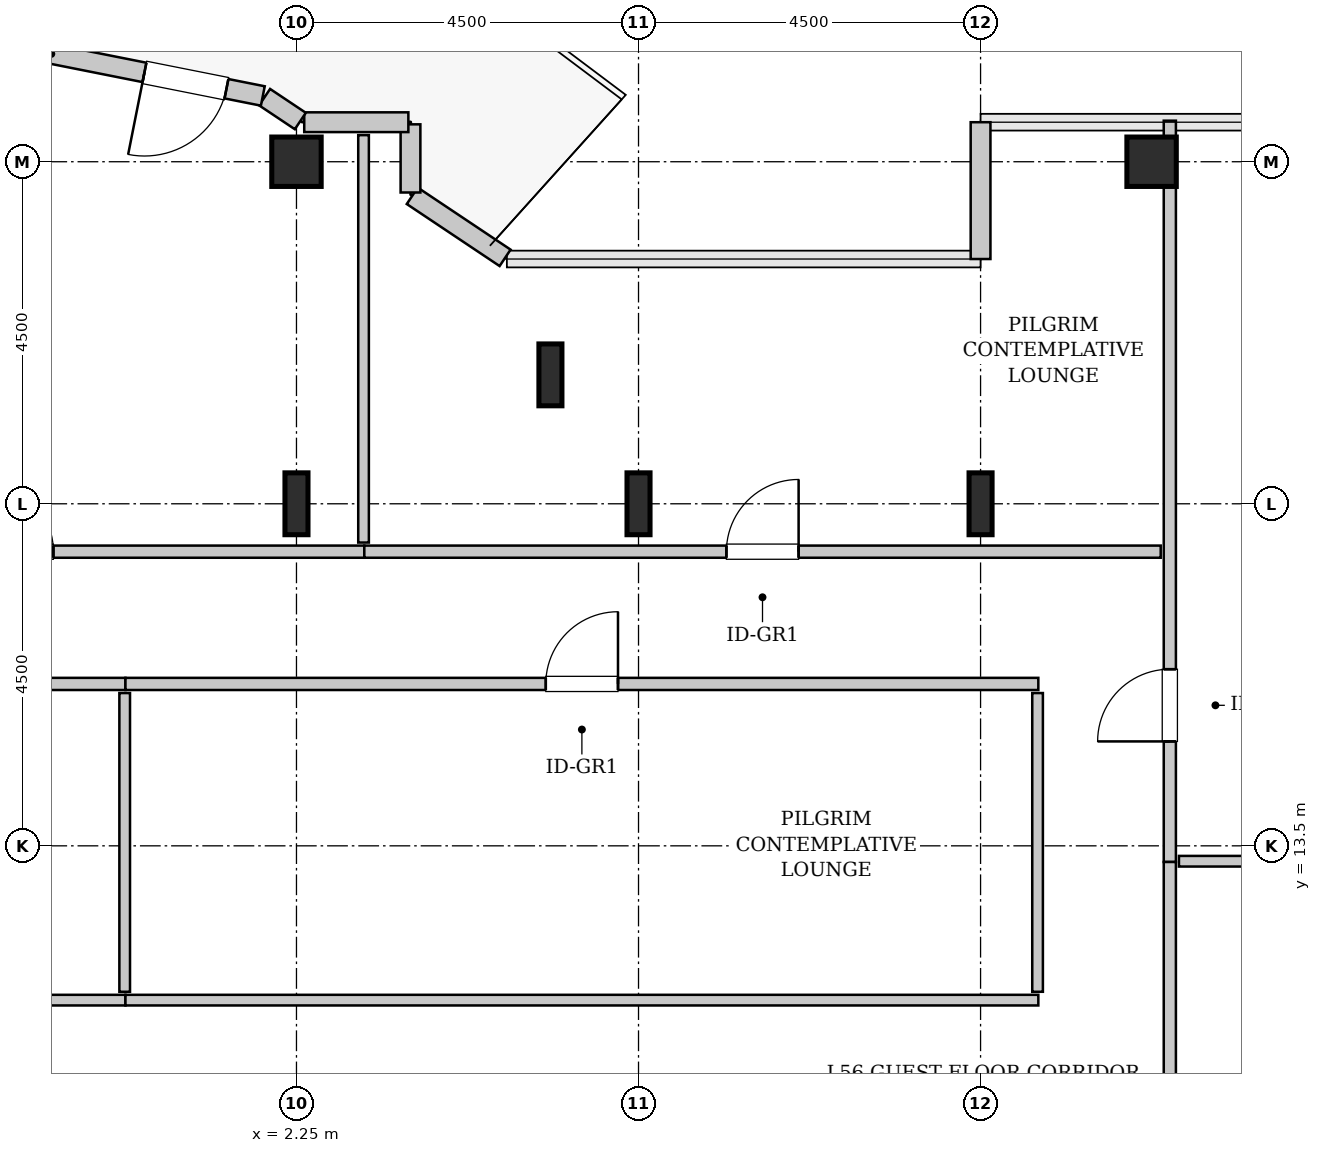
"""IFC4 building model, lengths in metres.
Left out: names, types, materials, properties, quantities, classifications, styles, units other than length and angle.
Written with IfcOpenShell. Run it as: python <this file> out.ifc"""

import sys

from ifc_helpers import new_model, si_unit, direction, frame, frame_2d, origin, origin_2d, place, context, subcontext, project, spatial, rectangle, hollow_rectangle, i_section, extrude, source, transform, mapped, element, fill, save


model = new_model("IFC4")
c1 = context("Model", 3, precision=1e-05, world=origin(), true_north=direction((0.0, 1.0)))
c2 = subcontext(c1, "Body", "Model", "MODEL_VIEW")
j1 = project(units=[si_unit("LENGTHUNIT", "METRE"), si_unit("PLANEANGLEUNIT", "RADIAN")], contexts=[c1])
p1 = place(None, origin())
s1 = spatial("IfcSite", under=j1, at=p1, CompositionType="ELEMENT")
p2 = place(p1, origin())
s2 = spatial("IfcBuilding", under=s1, at=p2, CompositionType="ELEMENT")
p3 = place(p2, frame((0.0, 0.0, 225.6)))
s3 = spatial("IfcBuildingStorey", under=s2, at=p3, CompositionType="ELEMENT", Elevation=225.6)
m1 = source(origin(), c2, "Body", "SweptSolid", [
    extrude(i_section(OverallWidth=0.303, OverallDepth=0.814, WebThickness=0.021, FlangeThickness=0.04, FilletRadius=0.03, at=origin_2d()), origin(), (0.0, 0.0, 1.0), 3.8),
])
p4 = place(p3, frame((2.25, 18.0, 0.0), z_axis=(0.0, 0.0, 1.0), x_axis=(1.0, 0.0, 0.0)))
e1 = element("IfcColumn", 1, at=p4, inside=s3, PredefinedType="COLUMN", context=c2, shape_type="MappedRepresentation", body=[
    mapped(m1, transform((0.0, 0.0, 0.0), x_axis=(1.0, 0.0, 0.0), y_axis=(0.0, 1.0, 0.0), z_axis=(0.0, 0.0, 1.0), scale=1.0)),
])
m2 = source(origin(), c2, "Body", "SweptSolid", [
    extrude(hollow_rectangle(XDim=0.65, YDim=0.65, WallThickness=0.032, InnerFilletRadius=0.032, OuterFilletRadius=0.064, at=origin_2d()), origin(), (0.0, 0.0, 1.0), 3.8),
])
p5 = place(p3, frame((2.25, 22.5, 0.0), z_axis=(0.0, 0.0, 1.0), x_axis=(1.0, 0.0, 0.0)))
e2 = element("IfcColumn", 2, at=p5, inside=s3, PredefinedType="COLUMN", context=c2, shape_type="MappedRepresentation", body=[
    mapped(m2, transform((0.0, 0.0, 0.0), x_axis=(1.0, 0.0, 0.0), y_axis=(0.0, 1.0, 0.0), z_axis=(0.0, 0.0, 1.0), scale=1.0)),
])
for number, where, z_axis, x_axis in (
    (3, (5.591, 19.696, 0.0), (0.0, 0.0, 1.0), (1.0, 0.0, 0.0)),
    (4, (6.75, 18.0, 0.0), (0.0, 0.0, 1.0), (1.0, 0.0, 0.0)),
    (5, (11.25, 18.0, 0.0), (0.0, 0.0, 1.0), (1.0, 0.0, 0.0)),
):
    element("IfcColumn", number, at=place(p3, frame(where, z_axis=z_axis, x_axis=x_axis)), inside=s3, PredefinedType="COLUMN", context=c2, shape_type="MappedRepresentation", body=[
        mapped(m1, transform((0.0, 0.0, 0.0), x_axis=(1.0, 0.0, 0.0), y_axis=(0.0, 1.0, 0.0), z_axis=(0.0, 0.0, 1.0), scale=1.0)),
    ])
p6 = place(p3, frame((13.5, 22.5, 0.0), z_axis=(0.0, 0.0, 1.0), x_axis=(1.0, 0.0, 0.0)))
e6 = element("IfcColumn", 6, at=p6, inside=s3, PredefinedType="COLUMN", context=c2, shape_type="MappedRepresentation", body=[
    mapped(m2, transform((0.0, 0.0, 0.0), x_axis=(1.0, 0.0, 0.0), y_axis=(0.0, 1.0, 0.0), z_axis=(0.0, 0.0, 1.0), scale=1.0)),
])
m3 = source(origin(), c2, "Body", "SweptSolid", [
    extrude(rectangle(XDim=1.8, YDim=0.26, at=frame_2d((0.9, 0.0))), origin(), (0.0, 0.0, 1.0), 3.55),
])
p7 = place(p3, frame((11.25, 23.02, 0.0), z_axis=(0.0, 0.0, 1.0), x_axis=(0.0, -1.0, 0.0)))
e7 = element("IfcWall", 7, at=p7, inside=s3, PredefinedType="SOLIDWALL", context=c2, shape_type="MappedRepresentation", body=[
    mapped(m3, transform((0.0, 0.0, 0.0), x_axis=(1.0, 0.0, 0.0), y_axis=(0.0, 1.0, 0.0), z_axis=(0.0, 0.0, 1.0), scale=1.0)),
])
m4 = source(origin(), c2, "Body", "SweptSolid", [
    extrude(rectangle(XDim=1.469, YDim=0.26, at=frame_2d((0.734, 0.0))), origin(), (0.0, 0.0, 1.0), 3.55),
])
p8 = place(p3, frame((4.995, 21.236, 0.0), z_axis=(0.0, 0.0, 1.0), x_axis=(-0.831461760506, 0.555581983884, 0.0)))
e8 = element("IfcWall", 8, at=p8, inside=s3, PredefinedType="SOLIDWALL", context=c2, shape_type="MappedRepresentation", body=[
    mapped(m4, transform((0.0, 0.0, 0.0), x_axis=(1.0, 0.0, 0.0), y_axis=(0.0, 1.0, 0.0), z_axis=(0.0, 0.0, 1.0), scale=1.0)),
])
m5 = source(origin(), c2, "Body", "SweptSolid", [
    extrude(rectangle(XDim=0.897, YDim=0.26, at=frame_2d((0.448, 0.0))), origin(), (0.0, 0.0, 1.0), 3.55),
])
p9 = place(p3, frame((3.75, 22.095, 0.0), z_axis=(0.0, 0.0, 1.0), x_axis=(0.0, 1.0, 0.0)))
e9 = element("IfcWall", 9, at=p9, inside=s3, PredefinedType="SOLIDWALL", context=c2, shape_type="MappedRepresentation", body=[
    mapped(m5, transform((0.0, 0.0, 0.0), x_axis=(1.0, 0.0, 0.0), y_axis=(0.0, 1.0, 0.0), z_axis=(0.0, 0.0, 1.0), scale=1.0)),
])
m6 = source(origin(), c2, "Body", "SweptSolid", [
    extrude(rectangle(XDim=1.37, YDim=0.26, at=frame_2d((0.685, 0.0))), origin(), (0.0, 0.0, 1.0), 3.55),
])
p10 = place(p3, frame((3.722, 23.02, 0.0), z_axis=(0.0, 0.0, 1.0), x_axis=(-1.0, 0.0, 0.0)))
e10 = element("IfcWall", 10, at=p10, inside=s3, PredefinedType="SOLIDWALL", context=c2, shape_type="MappedRepresentation", body=[
    mapped(m6, transform((0.0, 0.0, 0.0), x_axis=(1.0, 0.0, 0.0), y_axis=(0.0, 1.0, 0.0), z_axis=(0.0, 0.0, 1.0), scale=1.0)),
])
m7 = source(origin(), c2, "Body", "SweptSolid", [
    extrude(rectangle(XDim=0.565, YDim=0.26, at=frame_2d((0.283, 0.0))), origin(), (0.0, 0.0, 1.0), 3.55),
])
p11 = place(p3, frame((2.301, 23.036, 0.0), z_axis=(0.0, 0.0, 1.0), x_axis=(-0.831651492666, 0.555297933317, 0.0)))
e11 = element("IfcWall", 11, at=p11, inside=s3, PredefinedType="SOLIDWALL", context=c2, shape_type="MappedRepresentation", body=[
    mapped(m7, transform((0.0, 0.0, 0.0), x_axis=(1.0, 0.0, 0.0), y_axis=(0.0, 1.0, 0.0), z_axis=(0.0, 0.0, 1.0), scale=1.0)),
])
m8 = source(origin(), c2, "Body", "SweptSolid", [
    extrude(rectangle(XDim=4.137, YDim=0.26, at=frame_2d((2.068, 0.0))), origin(), (0.0, 0.0, 1.0), 3.55),
])
p12 = place(p3, frame((1.807, 23.365, 0.0), z_axis=(0.0, 0.0, 1.0), x_axis=(-0.980782170794, 0.195105954428, 0.0)))
e12 = element("IfcWall", 12, at=p12, inside=s3, PredefinedType="SOLIDWALL", context=c2, shape_type="MappedRepresentation", body=[
    mapped(m8, transform((0.0, 0.0, 0.0), x_axis=(1.0, 0.0, 0.0), y_axis=(0.0, 1.0, 0.0), z_axis=(0.0, 0.0, 1.0), scale=1.0)),
])
p13 = place(p12, frame((0.488, 0.0, 0.0)))
e13 = element("IfcOpeningElement", 13, at=p13, cuts=e12, PredefinedType="OPENING", context=c2, shape_type="SweptSolid", body=[
    extrude(rectangle(XDim=1.1, YDim=2.2, at=frame_2d((0.55, 1.1))), frame((0.0, 0.14, 0.0), z_axis=(0.0, -1.0, 0.0), x_axis=(1.0, 0.0, 0.0)), (0.0, 0.0, 1.0), 0.28),
])
m9 = source(origin(), c2, "Body", "SweptSolid", [
    extrude(rectangle(XDim=9.752, YDim=0.16, at=frame_2d((4.876, 0.0))), origin(), (0.0, 0.0, 1.0), 3.535),
])
p14 = place(p3, frame((13.74, 13.288, 0.0), z_axis=(0.0, 0.0, 1.0), x_axis=(0.0, 1.0, 0.0)))
e14 = element("IfcWall", 14, at=p14, inside=s3, PredefinedType="PARTITIONING", context=c2, shape_type="MappedRepresentation", body=[
    mapped(m9, transform((0.0, 0.0, 0.0), x_axis=(1.0, 0.0, 0.0), y_axis=(0.0, 1.0, 0.0), z_axis=(0.0, 0.0, 1.0), scale=1.0)),
])
p15 = place(p14, frame((1.586, 0.0, 0.0)))
e15 = element("IfcOpeningElement", 15, at=p15, cuts=e14, PredefinedType="OPENING", context=c2, shape_type="SweptSolid", body=[
    extrude(rectangle(XDim=0.95, YDim=2.1, at=frame_2d((0.475, 1.05))), frame((0.0, 0.09, 0.0), z_axis=(0.0, -1.0, 0.0), x_axis=(1.0, 0.0, 0.0)), (0.0, 0.0, 1.0), 0.18),
])
m10 = source(origin(), c2, "Body", "SweptSolid", [
    extrude(rectangle(XDim=11.43, YDim=0.14, at=frame_2d((5.715, 0.0))), origin(), (0.0, 0.0, 1.0), 2.925),
])
p16 = place(p3, frame((13.86, 13.298, 0.0), z_axis=(0.0, 0.0, 1.0), x_axis=(1.0, 0.0, 0.0)))
e16 = element("IfcWall", 16, at=p16, inside=s3, PredefinedType="PARTITIONING", context=c2, shape_type="MappedRepresentation", body=[
    mapped(m10, transform((0.0, 0.0, 0.0), x_axis=(1.0, 0.0, 0.0), y_axis=(0.0, 1.0, 0.0), z_axis=(0.0, 0.0, 1.0), scale=1.0)),
])
m11 = source(origin(), c2, "Body", "SweptSolid", [
    extrude(rectangle(XDim=9.693, YDim=0.16, at=frame_2d((4.846, 0.0))), origin(), (0.0, 0.0, 1.0), 3.535),
])
p17 = place(p3, frame((13.74, 3.595, 0.0), z_axis=(0.0, 0.0, 1.0), x_axis=(0.0, 1.0, 0.0)))
e17 = element("IfcWall", 17, at=p17, inside=s3, PredefinedType="PARTITIONING", context=c2, shape_type="MappedRepresentation", body=[
    mapped(m11, transform((0.0, 0.0, 0.0), x_axis=(1.0, 0.0, 0.0), y_axis=(0.0, 1.0, 0.0), z_axis=(0.0, 0.0, 1.0), scale=1.0)),
])
p18 = place(p17, frame((4.371, 0.0, 0.0)))
e18 = element("IfcOpeningElement", 18, at=p18, cuts=e17, PredefinedType="OPENING", context=c2, shape_type="SweptSolid", body=[
    extrude(rectangle(XDim=0.95, YDim=2.1, at=frame_2d((0.475, 1.05))), frame((0.0, 0.09, 0.0), z_axis=(0.0, -1.0, 0.0), x_axis=(1.0, 0.0, 0.0)), (0.0, 0.0, 1.0), 0.18),
])
m12 = source(origin(), c2, "Body", "SweptSolid", [
    extrude(rectangle(XDim=10.583, YDim=0.16, at=frame_2d((5.291, 0.0))), origin(), (0.0, 0.0, 1.0), 3.535),
])
p19 = place(p3, frame((-7.44, 17.37, 0.0), z_axis=(0.0, 0.0, 1.0), x_axis=(1.0, 0.0, 0.0)))
e19 = element("IfcWall", 19, at=p19, inside=s3, PredefinedType="PARTITIONING", context=c2, shape_type="MappedRepresentation", body=[
    mapped(m12, transform((0.0, 0.0, 0.0), x_axis=(1.0, 0.0, 0.0), y_axis=(0.0, 1.0, 0.0), z_axis=(0.0, 0.0, 1.0), scale=1.0)),
])
p20 = place(p19, frame((5.542, 0.0, 0.0)))
e20 = element("IfcOpeningElement", 20, at=p20, cuts=e19, PredefinedType="OPENING", context=c2, shape_type="SweptSolid", body=[
    extrude(rectangle(XDim=0.95, YDim=2.1, at=frame_2d((0.475, 1.05))), frame((0.0, 0.09, 0.0), z_axis=(0.0, -1.0, 0.0), x_axis=(1.0, 0.0, 0.0)), (0.0, 0.0, 1.0), 0.18),
])
m13 = source(origin(), c2, "Body", "SweptSolid", [
    extrude(rectangle(XDim=5.36, YDim=0.14, at=frame_2d((2.68, 0.0))), origin(), (0.0, 0.0, 1.0), 3.535),
])
p21 = place(p3, frame((3.133, 17.49, 0.0), z_axis=(0.0, 0.0, 1.0), x_axis=(0.0, 1.0, 0.0)))
e21 = element("IfcWall", 21, at=p21, inside=s3, PredefinedType="PARTITIONING", context=c2, shape_type="MappedRepresentation", body=[
    mapped(m13, transform((0.0, 0.0, 0.0), x_axis=(1.0, 0.0, 0.0), y_axis=(0.0, 1.0, 0.0), z_axis=(0.0, 0.0, 1.0), scale=1.0)),
])
m14 = source(origin(), c2, "Body", "SweptSolid", [
    extrude(rectangle(XDim=10.478, YDim=0.16, at=frame_2d((5.239, 0.0))), origin(), (0.0, 0.0, 1.0), 3.535),
])
p22 = place(p3, frame((3.143, 17.37, 0.0), z_axis=(0.0, 0.0, 1.0), x_axis=(1.0, 0.0, 0.0)))
e22 = element("IfcWall", 22, at=p22, inside=s3, PredefinedType="PARTITIONING", context=c2, shape_type="MappedRepresentation", body=[
    mapped(m14, transform((0.0, 0.0, 0.0), x_axis=(1.0, 0.0, 0.0), y_axis=(0.0, 1.0, 0.0), z_axis=(0.0, 0.0, 1.0), scale=1.0)),
])
p23 = place(p22, frame((4.764, 0.0, 0.0)))
e23 = element("IfcOpeningElement", 23, at=p23, cuts=e22, PredefinedType="OPENING", context=c2, shape_type="SweptSolid", body=[
    extrude(rectangle(XDim=0.95, YDim=2.1, at=frame_2d((0.475, 1.05))), frame((0.0, 0.09, 0.0), z_axis=(0.0, -1.0, 0.0), x_axis=(1.0, 0.0, 0.0)), (0.0, 0.0, 1.0), 0.18),
])
m15 = source(origin(), c2, "Body", "SweptSolid", [
    extrude(rectangle(XDim=12.01, YDim=0.16, at=frame_2d((6.005, 0.0))), origin(), (0.0, 0.0, 1.0), 3.535),
])
p24 = place(p3, frame((-12.01, 15.63, 0.0), z_axis=(0.0, 0.0, 1.0), x_axis=(1.0, 0.0, 0.0)))
e24 = element("IfcWall", 24, at=p24, inside=s3, PredefinedType="PARTITIONING", context=c2, shape_type="MappedRepresentation", body=[
    mapped(m15, transform((0.0, 0.0, 0.0), x_axis=(1.0, 0.0, 0.0), y_axis=(0.0, 1.0, 0.0), z_axis=(0.0, 0.0, 1.0), scale=1.0)),
])
p25 = place(p24, frame((5.53, 0.0, 0.0)))
e25 = element("IfcOpeningElement", 25, at=p25, cuts=e24, PredefinedType="OPENING", context=c2, shape_type="SweptSolid", body=[
    extrude(rectangle(XDim=0.95, YDim=2.1, at=frame_2d((0.475, 1.05))), frame((0.0, 0.09, 0.0), z_axis=(0.0, -1.0, 0.0), x_axis=(1.0, 0.0, 0.0)), (0.0, 0.0, 1.0), 0.18),
])
m16 = source(origin(), c2, "Body", "SweptSolid", [
    extrude(rectangle(XDim=12.01, YDim=0.14, at=frame_2d((6.005, 0.0))), origin(), (0.0, 0.0, 1.0), 3.535),
])
p26 = place(p3, frame((-12.01, 11.47, 0.0), z_axis=(0.0, 0.0, 1.0), x_axis=(1.0, 0.0, 0.0)))
e26 = element("IfcWall", 26, at=p26, inside=s3, PredefinedType="PARTITIONING", context=c2, shape_type="MappedRepresentation", body=[
    mapped(m16, transform((0.0, 0.0, 0.0), x_axis=(1.0, 0.0, 0.0), y_axis=(0.0, 1.0, 0.0), z_axis=(0.0, 0.0, 1.0), scale=1.0)),
])
m17 = source(origin(), c2, "Body", "SweptSolid", [
    extrude(rectangle(XDim=3.93, YDim=0.14, at=frame_2d((1.965, 0.0))), origin(), (0.0, 0.0, 1.0), 3.535),
])
p27 = place(p3, frame((-0.01, 11.58, 0.0), z_axis=(0.0, 0.0, 1.0), x_axis=(0.0, 1.0, 0.0)))
e27 = element("IfcWall", 27, at=p27, inside=s3, PredefinedType="PARTITIONING", context=c2, shape_type="MappedRepresentation", body=[
    mapped(m17, transform((0.0, 0.0, 0.0), x_axis=(1.0, 0.0, 0.0), y_axis=(0.0, 1.0, 0.0), z_axis=(0.0, 0.0, 1.0), scale=1.0)),
])
p28 = place(p3, frame((0.0, 15.63, 0.0), z_axis=(0.0, 0.0, 1.0), x_axis=(1.0, 0.0, 0.0)))
e28 = element("IfcWall", 28, at=p28, inside=s3, PredefinedType="PARTITIONING", context=c2, shape_type="MappedRepresentation", body=[
    mapped(m15, transform((0.0, 0.0, 0.0), x_axis=(1.0, 0.0, 0.0), y_axis=(0.0, 1.0, 0.0), z_axis=(0.0, 0.0, 1.0), scale=1.0)),
])
p29 = place(p28, frame((5.53, 0.0, 0.0)))
e29 = element("IfcOpeningElement", 29, at=p29, cuts=e28, PredefinedType="OPENING", context=c2, shape_type="SweptSolid", body=[
    extrude(rectangle(XDim=0.95, YDim=2.1, at=frame_2d((0.475, 1.05))), frame((0.0, 0.09, 0.0), z_axis=(0.0, -1.0, 0.0), x_axis=(1.0, 0.0, 0.0)), (0.0, 0.0, 1.0), 0.18),
])
p30 = place(p3, frame((0.0, 11.47, 0.0), z_axis=(0.0, 0.0, 1.0), x_axis=(1.0, 0.0, 0.0)))
e30 = element("IfcWall", 30, at=p30, inside=s3, PredefinedType="PARTITIONING", context=c2, shape_type="MappedRepresentation", body=[
    mapped(m16, transform((0.0, 0.0, 0.0), x_axis=(1.0, 0.0, 0.0), y_axis=(0.0, 1.0, 0.0), z_axis=(0.0, 0.0, 1.0), scale=1.0)),
])
p31 = place(p3, frame((12.0, 11.58, 0.0), z_axis=(0.0, 0.0, 1.0), x_axis=(0.0, 1.0, 0.0)))
e31 = element("IfcWall", 31, at=p31, inside=s3, PredefinedType="PARTITIONING", context=c2, shape_type="MappedRepresentation", body=[
    mapped(m17, transform((0.0, 0.0, 0.0), x_axis=(1.0, 0.0, 0.0), y_axis=(0.0, 1.0, 0.0), z_axis=(0.0, 0.0, 1.0), scale=1.0)),
])
m18 = source(origin(), c2, "Body", "SweptSolid", [
    extrude(rectangle(XDim=1.1, YDim=2.2, at=frame_2d((0.55, 1.1))), frame((0.0, 0.025, 0.0), z_axis=(0.0, -1.0, 0.0), x_axis=(1.0, 0.0, 0.0)), (0.0, 0.0, 1.0), 0.05),
])
p32 = place(p13, origin())
e32 = element("IfcDoor", 32, at=p32, inside=s3, OperationType="SINGLE_SWING_RIGHT", PredefinedType="DOOR", context=c2, shape_type="MappedRepresentation", body=[
    mapped(m18, transform((0.0, 0.0, 0.0), x_axis=(1.0, 0.0, 0.0), y_axis=(0.0, 1.0, 0.0), z_axis=(0.0, 0.0, 1.0), scale=1.0)),
])
fill(e13, e32)
m19 = source(origin(), c2, "Body", "SweptSolid", [
    extrude(rectangle(XDim=0.95, YDim=2.1, at=frame_2d((0.475, 1.05))), frame((0.0, 0.025, 0.0), z_axis=(0.0, -1.0, 0.0), x_axis=(1.0, 0.0, 0.0)), (0.0, 0.0, 1.0), 0.05),
])
p33 = place(p15, origin())
e33 = element("IfcDoor", 33, at=p33, inside=s3, OperationType="SINGLE_SWING_LEFT", PredefinedType="DOOR", context=c2, shape_type="MappedRepresentation", body=[
    mapped(m19, transform((0.0, 0.0, 0.0), x_axis=(1.0, 0.0, 0.0), y_axis=(0.0, 1.0, 0.0), z_axis=(0.0, 0.0, 1.0), scale=1.0)),
])
fill(e15, e33)
p34 = place(p20, origin())
e34 = element("IfcDoor", 34, at=p34, inside=s3, OperationType="SINGLE_SWING_LEFT", PredefinedType="DOOR", context=c2, shape_type="MappedRepresentation", body=[
    mapped(m19, transform((0.0, 0.0, 0.0), x_axis=(1.0, 0.0, 0.0), y_axis=(0.0, 1.0, 0.0), z_axis=(0.0, 0.0, 1.0), scale=1.0)),
])
fill(e20, e34)
p35 = place(p23, origin())
e35 = element("IfcDoor", 35, at=p35, inside=s3, OperationType="SINGLE_SWING_RIGHT", PredefinedType="DOOR", context=c2, shape_type="MappedRepresentation", body=[
    mapped(m19, transform((0.0, 0.0, 0.0), x_axis=(1.0, 0.0, 0.0), y_axis=(0.0, 1.0, 0.0), z_axis=(0.0, 0.0, 1.0), scale=1.0)),
])
fill(e23, e35)
p36 = place(p29, origin())
e36 = element("IfcDoor", 36, at=p36, inside=s3, OperationType="SINGLE_SWING_RIGHT", PredefinedType="DOOR", context=c2, shape_type="MappedRepresentation", body=[
    mapped(m19, transform((0.0, 0.0, 0.0), x_axis=(1.0, 0.0, 0.0), y_axis=(0.0, 1.0, 0.0), z_axis=(0.0, 0.0, 1.0), scale=1.0)),
])
fill(e29, e36)
save(model, sys.argv[1])
